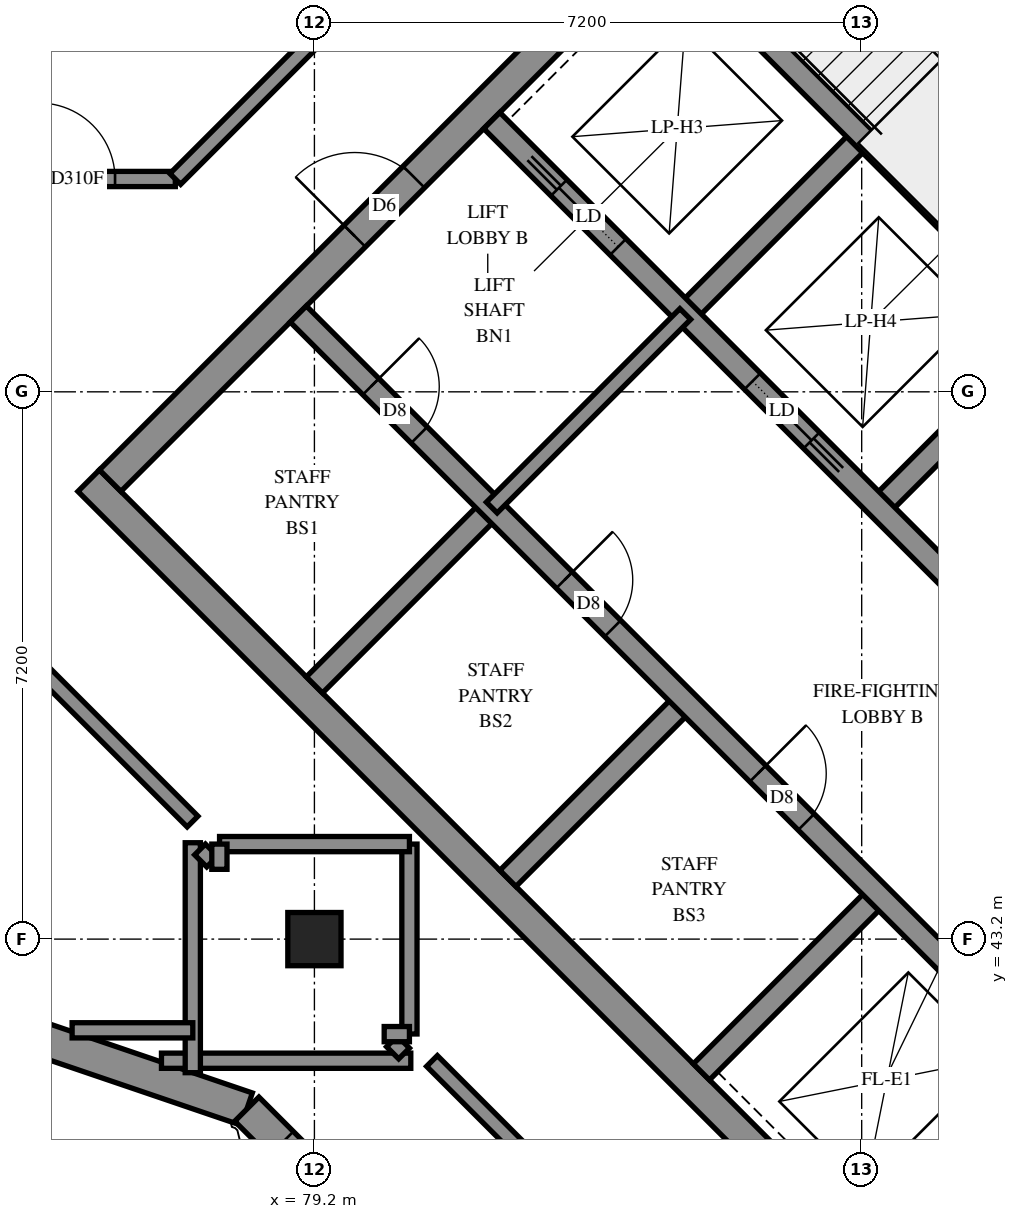
"""IFC4 building model, lengths in metres.
Left out: names, types, materials, properties, quantities, classifications, styles, units other than length and angle.
Written with IfcOpenShell. Run it as: python <this file> out.ifc"""

import sys

from ifc_helpers import new_model, si_unit, direction, frame, frame_2d, origin, origin_2d, place, context, subcontext, project, spatial, polyline, rectangle, outline, extrude, element, fill, save


model = new_model("IFC4")
c1 = context("Model", 3, precision=1e-05, world=origin(), true_north=direction((0.0, 1.0)))
c2 = subcontext(c1, "Body", "Model", "MODEL_VIEW")
j1 = project(units=[si_unit("LENGTHUNIT", "METRE"), si_unit("PLANEANGLEUNIT", "RADIAN")], contexts=[c1])
p1 = place(None, origin())
s1 = spatial("IfcSite", under=j1, at=p1, CompositionType="ELEMENT")
p2 = place(p1, origin())
s2 = spatial("IfcBuilding", under=s1, at=p2, CompositionType="ELEMENT")
p3 = place(p2, frame((0.0, 0.0, 281.2)))
s3 = spatial("IfcBuildingStorey", under=s2, at=p3, CompositionType="ELEMENT", Elevation=281.2)
p4 = place(p3, frame((79.2, 43.2, 0.0), z_axis=(0.0, 0.0, 1.0), x_axis=(1.0, 0.0, 0.0)))
e1 = element("IfcColumn", 1, at=p4, inside=s3, PredefinedType="COLUMN", context=c2, shape_type="SweptSolid", body=[
    extrude(rectangle(XDim=0.7, YDim=0.7, at=origin_2d()), origin(), (0.0, 0.0, 1.0), 3.1),
])
p5 = place(p3, frame((76.23, 49.231, -0.3), z_axis=(0.0, 0.0, 1.0), x_axis=(0.7071034917, -0.7071100706, 0.0)))
e2 = element("IfcWall", 2, at=p5, inside=s3, PredefinedType="SHEAR", context=c2, shape_type="SweptSolid", body=[
    extrude(rectangle(XDim=15.2, YDim=0.4, at=frame_2d((7.6, 0.0))), origin(), (0.0, 0.0, 1.0), 2.7),
])
p6 = place(p3, frame((86.695, 59.696, -0.3), z_axis=(0.0, 0.0, 1.0), x_axis=(0.7071100706, -0.7071034917, 0.0)))
e3 = element("IfcWall", 3, at=p6, inside=s3, PredefinedType="SHEAR", context=c2, shape_type="SweptSolid", body=[
    extrude(rectangle(XDim=15.2, YDim=0.4, at=frame_2d((7.6, 0.0))), origin(), (0.0, 0.0, 1.0), 2.7),
])
p7 = place(p6, frame((10.4, 0.0, 0.3)))
e4 = element("IfcOpeningElement", 4, at=p7, cuts=e3, PredefinedType="OPENING", context=c2, shape_type="SweptSolid", body=[
    extrude(rectangle(XDim=0.8, YDim=2.1, at=frame_2d((0.4, 1.05))), frame((0.0, 0.21, 0.0), z_axis=(0.0, -1.0, 0.0), x_axis=(1.0, 0.0, 0.0)), (0.0, 0.0, 1.0), 0.42),
])
p8 = place(p3, frame((76.513, 49.231, -0.3), z_axis=(0.0, 0.0, 1.0), x_axis=(0.7071067812, 0.7071067812, 0.0)))
e5 = element("IfcWall", 5, at=p8, inside=s3, PredefinedType="SHEAR", context=c2, shape_type="SweptSolid", body=[
    extrude(rectangle(XDim=14.4, YDim=0.4, at=frame_2d((7.2, 0.0))), origin(), (0.0, 0.0, 1.0), 2.7),
])
p9 = place(p8, frame((4.55, 0.0, 0.3)))
e6 = element("IfcOpeningElement", 6, at=p9, cuts=e5, PredefinedType="OPENING", context=c2, shape_type="SweptSolid", body=[
    extrude(rectangle(XDim=1.1, YDim=2.1, at=frame_2d((0.55, 1.05))), frame((0.0, 0.21, 0.0), z_axis=(0.0, -1.0, 0.0), x_axis=(1.0, 0.0, 0.0)), (0.0, 0.0, 1.0), 0.42),
])
p10 = place(p8, frame((11.35, 0.0, 0.3)))
e7 = element("IfcOpeningElement", 7, at=p10, cuts=e5, PredefinedType="OPENING", context=c2, shape_type="SweptSolid", body=[
    extrude(rectangle(XDim=1.1, YDim=2.1, at=frame_2d((0.55, 1.05))), frame((0.0, 0.21, 0.0), z_axis=(0.0, -1.0, 0.0), x_axis=(1.0, 0.0, 0.0)), (0.0, 0.0, 1.0), 0.42),
])
p11 = place(p3, frame((86.978, 38.766, -0.3), z_axis=(0.0, 0.0, 1.0), x_axis=(0.7071067812, 0.7071067812, 0.0)))
e8 = element("IfcWall", 8, at=p11, inside=s3, PredefinedType="SHEAR", context=c2, shape_type="SweptSolid", body=[
    extrude(rectangle(XDim=14.4, YDim=0.4, at=frame_2d((7.2, 0.0))), origin(), (0.0, 0.0, 1.0), 2.7),
])
p12 = place(p11, frame((4.55, 0.0, 0.3)))
e9 = element("IfcOpeningElement", 9, at=p12, cuts=e8, PredefinedType="OPENING", context=c2, shape_type="SweptSolid", body=[
    extrude(rectangle(XDim=1.1, YDim=2.1, at=frame_2d((0.55, 1.05))), frame((0.0, 0.21, 0.0), z_axis=(0.0, -1.0, 0.0), x_axis=(1.0, 0.0, 0.0)), (0.0, 0.0, 1.0), 0.42),
])
p13 = place(p11, frame((11.35, 0.0, 0.3)))
e10 = element("IfcOpeningElement", 10, at=p13, cuts=e8, PredefinedType="OPENING", context=c2, shape_type="SweptSolid", body=[
    extrude(rectangle(XDim=1.1, YDim=2.1, at=frame_2d((0.55, 1.05))), frame((0.0, 0.21, 0.0), z_axis=(0.0, -1.0, 0.0), x_axis=(1.0, 0.0, 0.0)), (0.0, 0.0, 1.0), 0.42),
])
for number, where, z_axis, x_axis in (
    (11, (79.2, 46.544, 0.0), (0.0, 0.0, 1.0), (0.707, 0.707, 0.0)),
    (12, (84.079, 51.423, 0.0), (0.0, 0.0, 1.0), (0.707, 0.707, 0.0)),
):
    element("IfcWall", number, at=place(p3, frame(where, z_axis=z_axis, x_axis=x_axis)), inside=s3, PredefinedType="SOLIDWALL", context=c2, shape_type="SweptSolid", body=[
        extrude(rectangle(XDim=3.3, YDim=0.3, at=frame_2d((1.65, 0.0))), origin(), (0.0, 0.0, 1.0), 3.1),
    ])
p14 = place(p3, frame((81.746, 43.999, 0.0), z_axis=(0.0, 0.0, 1.0), x_axis=(0.7071067812, 0.7071067812, 0.0)))
e13 = element("IfcWall", 13, at=p14, inside=s3, PredefinedType="SOLIDWALL", context=c2, shape_type="SweptSolid", body=[
    extrude(rectangle(XDim=3.3, YDim=0.3, at=frame_2d((1.65, 0.0))), origin(), (0.0, 0.0, 1.0), 3.1),
])
p15 = place(p3, frame((86.625, 48.878, 0.0), z_axis=(0.0, 0.0, 1.0), x_axis=(0.7071067812, 0.7071067812, 0.0)))
e14 = element("IfcWall", 14, at=p15, inside=s3, PredefinedType="SOLIDWALL", context=c2, shape_type="SweptSolid", body=[
    extrude(rectangle(XDim=3.3, YDim=0.3, at=frame_2d((1.65, 0.0))), origin(), (0.0, 0.0, 1.0), 3.1),
])
p16 = place(p3, frame((84.291, 41.453, 0.0), z_axis=(0.0, 0.0, 1.0), x_axis=(0.7071067812, 0.7071067812, 0.0)))
e15 = element("IfcWall", 15, at=p16, inside=s3, PredefinedType="SOLIDWALL", context=c2, shape_type="SweptSolid", body=[
    extrude(rectangle(XDim=3.3, YDim=0.3, at=frame_2d((1.65, 0.0))), origin(), (0.0, 0.0, 1.0), 3.1),
])
p17 = place(p3, frame((78.988, 51.423, 0.0), z_axis=(0.0, 0.0, 1.0), x_axis=(0.7071067812, -0.7071067812, 0.0)))
e16 = element("IfcWall", 16, at=p17, inside=s3, PredefinedType="SOLIDWALL", context=c2, shape_type="SweptSolid", body=[
    extrude(rectangle(XDim=14.4, YDim=0.3, at=frame_2d((7.2, 0.0))), origin(), (0.0, 0.0, 1.0), 3.1),
])
p18 = place(p17, frame((1.35, 0.0, 0.0)))
e17 = element("IfcOpeningElement", 17, at=p18, cuts=e16, PredefinedType="OPENING", context=c2, shape_type="SweptSolid", body=[
    extrude(rectangle(XDim=0.9, YDim=2.1, at=frame_2d((0.45, 1.05))), frame((0.0, 0.16, 0.0), z_axis=(0.0, -1.0, 0.0), x_axis=(1.0, 0.0, 0.0)), (0.0, 0.0, 1.0), 0.32),
])
p19 = place(p17, frame((4.95, 0.0, 0.0)))
e18 = element("IfcOpeningElement", 18, at=p19, cuts=e16, PredefinedType="OPENING", context=c2, shape_type="SweptSolid", body=[
    extrude(rectangle(XDim=0.9, YDim=2.1, at=frame_2d((0.45, 1.05))), frame((0.0, 0.16, 0.0), z_axis=(0.0, -1.0, 0.0), x_axis=(1.0, 0.0, 0.0)), (0.0, 0.0, 1.0), 0.32),
])
p20 = place(p17, frame((8.55, 0.0, 0.0)))
e19 = element("IfcOpeningElement", 19, at=p20, cuts=e16, PredefinedType="OPENING", context=c2, shape_type="SweptSolid", body=[
    extrude(rectangle(XDim=0.9, YDim=2.1, at=frame_2d((0.45, 1.05))), frame((0.0, 0.16, 0.0), z_axis=(0.0, -1.0, 0.0), x_axis=(1.0, 0.0, 0.0)), (0.0, 0.0, 1.0), 0.32),
])
p21 = place(p17, frame((12.05, 0.0, 0.0)))
e20 = element("IfcOpeningElement", 20, at=p21, cuts=e16, PredefinedType="OPENING", context=c2, shape_type="SweptSolid", body=[
    extrude(rectangle(XDim=1.1, YDim=2.1, at=frame_2d((0.55, 1.05))), frame((0.0, 0.16, 0.0), z_axis=(0.0, -1.0, 0.0), x_axis=(1.0, 0.0, 0.0)), (0.0, 0.0, 1.0), 0.32),
])
p22 = place(p3, frame((81.534, 53.969, 0.0), z_axis=(0.0, 0.0, 1.0), x_axis=(0.707103309, -0.7071102534, 0.0)))
e21 = element("IfcWall", 21, at=p22, inside=s3, PredefinedType="SOLIDWALL", context=c2, shape_type="SweptSolid", body=[
    extrude(rectangle(XDim=14.4, YDim=0.3, at=frame_2d((7.2, 0.0))), origin(), (0.0, 0.0, 1.0), 3.1),
])
p23 = place(p22, frame((8.55, 0.0, 0.0)))
e22 = element("IfcOpeningElement", 22, at=p23, cuts=e21, PredefinedType="OPENING", context=c2, shape_type="SweptSolid", body=[
    extrude(rectangle(XDim=0.9, YDim=2.1, at=frame_2d((0.45, 1.05))), frame((0.0, 0.16, 0.0), z_axis=(0.0, -1.0, 0.0), x_axis=(1.0, 0.0, 0.0)), (0.0, 0.0, 1.0), 0.32),
])
p24 = place(p22, frame((1.25, 0.0, 0.0)))
e23 = element("IfcOpeningElement", 23, at=p24, cuts=e21, PredefinedType="OPENING", context=c2, shape_type="SweptSolid", body=[
    extrude(rectangle(XDim=1.1, YDim=2.1, at=frame_2d((0.55, 1.05))), frame((0.0, 0.16, 0.0), z_axis=(0.0, -1.0, 0.0), x_axis=(1.0, 0.0, 0.0)), (0.0, 0.0, 1.0), 0.32),
])
p25 = place(p22, frame((4.85, 0.0, 0.0)))
e24 = element("IfcOpeningElement", 24, at=p25, cuts=e21, PredefinedType="OPENING", context=c2, shape_type="SweptSolid", body=[
    extrude(rectangle(XDim=1.1, YDim=2.1, at=frame_2d((0.55, 1.05))), frame((0.0, 0.16, 0.0), z_axis=(0.0, -1.0, 0.0), x_axis=(1.0, 0.0, 0.0)), (0.0, 0.0, 1.0), 0.32),
])
p26 = place(p22, frame((12.05, 0.0, 0.0)))
e25 = element("IfcOpeningElement", 25, at=p26, cuts=e21, PredefinedType="OPENING", context=c2, shape_type="SweptSolid", body=[
    extrude(rectangle(XDim=1.1, YDim=2.1, at=frame_2d((0.55, 1.05))), frame((0.0, 0.16, 0.0), z_axis=(0.0, -1.0, 0.0), x_axis=(1.0, 0.0, 0.0)), (0.0, 0.0, 1.0), 0.32),
])
p27 = place(p3, frame((83.867, 56.302, 0.0), z_axis=(0.0, 0.0, 1.0), x_axis=(0.7071137256, -0.7070998367, 0.0)))
e26 = element("IfcWall", 26, at=p27, inside=s3, PredefinedType="SOLIDWALL", context=c2, shape_type="SweptSolid", body=[
    extrude(rectangle(XDim=7.2, YDim=0.3, at=frame_2d((3.6, 0.0))), origin(), (0.0, 0.0, 1.0), 3.1),
])
p28 = place(p3, frame((74.583, 42.231, 0.0), z_axis=(0.0, 0.0, 1.0), x_axis=(0.9466967117, -0.3221262734, 0.0)))
e27 = element("IfcWall", 27, at=p28, inside=s3, PredefinedType="SOLIDWALL", context=c2, shape_type="SweptSolid", body=[
    extrude(outline(polyline([(0.058, -0.225), (3.885, -0.225), (3.99, 0.225), (-0.058, 0.225), (0.058, -0.225)])), origin(), (0.0, 0.0, 1.0), 3.1),
])
p29 = place(p3, frame((78.311, 40.963, 0.0), z_axis=(0.0, 0.0, 1.0), x_axis=(0.7071067812, -0.7071067812, 0.0)))
e28 = element("IfcWall", 28, at=p29, inside=s3, PredefinedType="SOLIDWALL", context=c2, shape_type="SweptSolid", body=[
    extrude(outline(polyline([(0.052, -0.225), (15.882, -0.225), (15.432, 0.225), (-0.052, 0.225), (0.052, -0.225)])), origin(), (0.0, 0.0, 1.0), 3.1),
])
p30 = place(p29, frame((0.641, 0.0, 0.45)))
e29 = element("IfcOpeningElement", 29, at=p30, cuts=e28, PredefinedType="OPENING", context=c2, shape_type="SweptSolid", body=[
    extrude(rectangle(XDim=2.8, YDim=2.55, at=frame_2d((1.4, 1.275))), frame((0.0, 0.235, 0.0), z_axis=(0.0, -1.0, 0.0), x_axis=(1.0, 0.0, 0.0)), (0.0, 0.0, 1.0), 0.47),
])
p31 = place(p29, frame((4.282, 0.0, 0.45)))
e30 = element("IfcOpeningElement", 30, at=p31, cuts=e28, PredefinedType="OPENING", context=c2, shape_type="SweptSolid", body=[
    extrude(rectangle(XDim=2.8, YDim=2.55, at=frame_2d((1.4, 1.275))), frame((0.0, 0.235, 0.0), z_axis=(0.0, -1.0, 0.0), x_axis=(1.0, 0.0, 0.0)), (0.0, 0.0, 1.0), 0.47),
])
p32 = place(p29, frame((7.882, 0.0, 0.45)))
e31 = element("IfcOpeningElement", 31, at=p32, cuts=e28, PredefinedType="OPENING", context=c2, shape_type="SweptSolid", body=[
    extrude(rectangle(XDim=2.8, YDim=2.55, at=frame_2d((1.4, 1.275))), frame((0.0, 0.235, 0.0), z_axis=(0.0, -1.0, 0.0), x_axis=(1.0, 0.0, 0.0)), (0.0, 0.0, 1.0), 0.47),
])
p33 = place(p29, frame((11.482, 0.0, 0.45)))
e32 = element("IfcOpeningElement", 32, at=p33, cuts=e28, PredefinedType="OPENING", context=c2, shape_type="SweptSolid", body=[
    extrude(rectangle(XDim=2.8, YDim=2.55, at=frame_2d((1.4, 1.275))), frame((0.0, 0.235, 0.0), z_axis=(0.0, -1.0, 0.0), x_axis=(1.0, 0.0, 0.0)), (0.0, 0.0, 1.0), 0.47),
])
p34 = place(p3, frame((81.534, 48.878, 0.0), z_axis=(0.0, 0.0, 1.0), x_axis=(0.707092892, 0.7071206701, 0.0)))
e33 = element("IfcWall", 33, at=p34, inside=s3, PredefinedType="PARTITIONING", context=c2, shape_type="SweptSolid", body=[
    extrude(rectangle(XDim=3.6, YDim=0.2, at=frame_2d((1.8, 0.0))), origin(), (0.0, 0.0, 1.0), 3.1),
])
p35 = place(p3, frame((86.306, 33.287, 0.0), z_axis=(0.0, 0.0, 1.0), x_axis=(0.7071020418, 0.7071115206, 0.0)))
e34 = element("IfcWall", 34, at=p35, inside=s3, PredefinedType="PARTITIONING", context=c2, shape_type="SweptSolid", body=[
    extrude(rectangle(XDim=10.55, YDim=0.2, at=frame_2d((5.275, 0.0))), origin(), (0.0, 0.0, 1.0), 3.1),
])
p36 = place(p3, frame((80.747, 41.597, 0.0), z_axis=(0.0, 0.0, 1.0), x_axis=(0.7071067812, -0.7071067812, 0.0)))
e35 = element("IfcWall", 35, at=p36, inside=s3, PredefinedType="PARTITIONING", context=c2, shape_type="SweptSolid", body=[
    extrude(rectangle(XDim=8.607, YDim=0.2, at=frame_2d((4.303, 0.0))), origin(), (0.0, 0.0, 1.0), 3.1),
])
p37 = place(p3, frame((86.837, 35.515, 0.0), z_axis=(0.0, 0.0, 1.0), x_axis=(0.7071067812, 0.7071067812, 0.0)))
e36 = element("IfcWall", 36, at=p37, inside=s3, PredefinedType="PARTITIONING", context=c2, shape_type="SweptSolid", body=[
    extrude(rectangle(XDim=8.598, YDim=0.2, at=frame_2d((4.299, 0.0))), origin(), (0.0, 0.0, 1.0), 3.1),
])
p38 = place(p37, frame((7.4, 0.0, 0.0)))
e37 = element("IfcOpeningElement", 37, at=p38, cuts=e36, PredefinedType="OPENING", context=c2, shape_type="SweptSolid", body=[
    extrude(rectangle(XDim=1.0, YDim=2.1, at=frame_2d((0.5, 1.05))), frame((0.0, 0.11, 0.0), z_axis=(0.0, -1.0, 0.0), x_axis=(1.0, 0.0, 0.0)), (0.0, 0.0, 1.0), 0.22),
])
p39 = place(p3, frame((74.347, 47.997, 0.0), z_axis=(0.0, 0.0, 1.0), x_axis=(0.7071067812, -0.7071067812, 0.0)))
e38 = element("IfcWall", 38, at=p39, inside=s3, PredefinedType="PARTITIONING", context=c2, shape_type="SweptSolid", body=[
    extrude(rectangle(XDim=4.596, YDim=0.2, at=frame_2d((2.298, 0.0))), origin(), (0.0, 0.0, 1.0), 3.1),
])
p40 = place(p39, frame((0.401, 0.0, 0.0)))
e39 = element("IfcOpeningElement", 39, at=p40, cuts=e38, PredefinedType="OPENING", context=c2, shape_type="SweptSolid", body=[
    extrude(rectangle(XDim=1.0, YDim=2.1, at=frame_2d((0.5, 1.05))), frame((0.0, 0.11, 0.0), z_axis=(0.0, -1.0, 0.0), x_axis=(1.0, 0.0, 0.0)), (0.0, 0.0, 1.0), 0.22),
])
p41 = place(p3, frame((77.188, 41.6, 0.0), z_axis=(0.0, 0.0, 1.0), x_axis=(1.0, 0.0, 0.0)))
e40 = element("IfcWall", 40, at=p41, inside=s3, PredefinedType="PARTITIONING", context=c2, shape_type="SweptSolid", body=[
    extrude(rectangle(XDim=3.28, YDim=0.2, at=frame_2d((1.64, 0.0))), origin(), (0.0, 0.0, 1.0), 3.1),
])
p42 = place(p3, frame((74.402, 53.2, 0.0), z_axis=(0.0, 0.0, 1.0), x_axis=(1.0, 0.0, 0.0)))
e41 = element("IfcWall", 41, at=p42, inside=s3, PredefinedType="PARTITIONING", context=c2, shape_type="SweptSolid", body=[
    extrude(rectangle(XDim=2.968, YDim=0.2, at=frame_2d((1.484, 0.0))), origin(), (0.0, 0.0, 1.0), 3.1),
])
p43 = place(p42, frame((1.175, 0.0, 0.0)))
e42 = element("IfcOpeningElement", 42, at=p43, cuts=e41, PredefinedType="OPENING", context=c2, shape_type="SweptSolid", body=[
    extrude(rectangle(XDim=1.0, YDim=2.1, at=frame_2d((0.5, 1.05))), frame((0.0, 0.11, 0.0), z_axis=(0.0, -1.0, 0.0), x_axis=(1.0, 0.0, 0.0)), (0.0, 0.0, 1.0), 0.22),
])
p44 = place(p3, frame((77.6, 41.443, 0.0), z_axis=(0.0, 0.0, 1.0), x_axis=(0.0, 1.0, 0.0)))
e43 = element("IfcWall", 43, at=p44, inside=s3, PredefinedType="PARTITIONING", context=c2, shape_type="SweptSolid", body=[
    extrude(rectangle(XDim=3.025, YDim=0.2, at=frame_2d((1.513, 0.0))), origin(), (0.0, 0.0, 1.0), 3.1),
])
p45 = place(p3, frame((77.37, 53.2, 0.0), z_axis=(0.0, 0.0, 1.0), x_axis=(0.7071067812, 0.7071067812, 0.0)))
e44 = element("IfcWall", 44, at=p45, inside=s3, PredefinedType="PARTITIONING", context=c2, shape_type="SweptSolid", body=[
    extrude(rectangle(XDim=2.786, YDim=0.2, at=frame_2d((1.393, 0.0))), origin(), (0.0, 0.0, 1.0), 3.1),
])
for number, where, z_axis, x_axis in (
    (45, (80.45, 41.952, 0.0), (0.0, 0.0, 1.0), (0.0, 1.0, 0.0)),
    (46, (77.952, 44.45, 0.0), (0.0, 0.0, 1.0), (1.0, 0.0, 0.0)),
):
    element("IfcWall", number, at=place(p3, frame(where, z_axis=z_axis, x_axis=x_axis)), inside=s3, PredefinedType="PARTITIONING", context=c2, shape_type="SweptSolid", body=[
        extrude(rectangle(XDim=2.498, YDim=0.2, at=frame_2d((1.249, 0.0))), origin(), (0.0, 0.0, 1.0), 3.1),
    ])
p46 = place(p3, frame((76.012, 42.0, 0.0), z_axis=(0.0, 0.0, 1.0), x_axis=(1.0, 0.0, 0.0)))
e47 = element("IfcWall", 47, at=p46, inside=s3, PredefinedType="PARTITIONING", context=c2, shape_type="SweptSolid", body=[
    extrude(rectangle(XDim=1.588, YDim=0.2, at=frame_2d((0.794, 0.0))), origin(), (0.0, 0.0, 1.0), 3.1),
])
for number, where, z_axis, x_axis in (
    (48, (80.221, 41.855, 0.0), (0.0, 0.0, 1.0), (0.707, -0.707, 0.0)),
    (49, (77.695, 44.38, 0.0), (0.0, 0.0, 1.0), (0.707, -0.707, 0.0)),
):
    element("IfcWall", number, at=place(p3, frame(where, z_axis=z_axis, x_axis=x_axis)), inside=s3, PredefinedType="PARTITIONING", context=c2, shape_type="SweptSolid", body=[
        extrude(rectangle(XDim=0.225, YDim=0.2, at=frame_2d((0.112, 0.0))), origin(), (0.0, 0.0, 1.0), 3.1),
    ])
for number, where, z_axis, x_axis in (
    (50, (80.118, 41.95, 0.0), (0.0, 0.0, 1.0), (1.0, 0.0, 0.0)),
    (51, (77.95, 44.118, 0.0), (0.0, 0.0, 1.0), (0.0, 1.0, 0.0)),
):
    element("IfcWall", number, at=place(p3, frame(where, z_axis=z_axis, x_axis=x_axis)), inside=s3, PredefinedType="PARTITIONING", context=c2, shape_type="SweptSolid", body=[
        extrude(rectangle(XDim=0.332, YDim=0.2, at=frame_2d((0.166, 0.0))), origin(), (0.0, 0.0, 1.0), 3.1),
    ])
p47 = place(p30, origin())
e52 = element("IfcWindow", 52, at=p47, inside=s3, PartitioningType="SINGLE_PANEL", PredefinedType="WINDOW", context=c2, shape_type="SweptSolid", body=[
    extrude(rectangle(XDim=2.8, YDim=2.55, at=frame_2d((1.4, 1.275))), frame((0.0, 0.205, 0.0), z_axis=(0.0, -1.0, 0.0), x_axis=(1.0, 0.0, 0.0)), (0.0, 0.0, 1.0), 0.06),
])
fill(e29, e52)
p48 = place(p9, origin())
e53 = element("IfcDoor", 53, at=p48, inside=s3, OperationType="DOUBLE_DOOR_SINGLE_SWING", PredefinedType="DOOR", context=c2, shape_type="SweptSolid", body=[
    extrude(rectangle(XDim=1.1, YDim=2.1, at=frame_2d((0.55, 1.05))), frame((0.0, 0.025, 0.0), z_axis=(0.0, -1.0, 0.0), x_axis=(1.0, 0.0, 0.0)), (0.0, 0.0, 1.0), 0.05),
])
fill(e6, e53)
p49 = place(p18, origin())
e54 = element("IfcDoor", 54, at=p49, inside=s3, OperationType="SINGLE_SWING_LEFT", PredefinedType="DOOR", context=c2, shape_type="SweptSolid", body=[
    extrude(rectangle(XDim=0.9, YDim=2.1, at=frame_2d((0.45, 1.05))), frame((0.0, 0.025, 0.0), z_axis=(0.0, -1.0, 0.0), x_axis=(1.0, 0.0, 0.0)), (0.0, 0.0, 1.0), 0.05),
])
fill(e17, e54)
p50 = place(p19, origin())
e55 = element("IfcDoor", 55, at=p50, inside=s3, OperationType="SINGLE_SWING_LEFT", PredefinedType="DOOR", context=c2, shape_type="SweptSolid", body=[
    extrude(rectangle(XDim=0.9, YDim=2.1, at=frame_2d((0.45, 1.05))), frame((0.0, 0.025, 0.0), z_axis=(0.0, -1.0, 0.0), x_axis=(1.0, 0.0, 0.0)), (0.0, 0.0, 1.0), 0.05),
])
fill(e18, e55)
p51 = place(p20, origin())
e56 = element("IfcDoor", 56, at=p51, inside=s3, OperationType="SINGLE_SWING_LEFT", PredefinedType="DOOR", context=c2, shape_type="SweptSolid", body=[
    extrude(rectangle(XDim=0.9, YDim=2.1, at=frame_2d((0.45, 1.05))), frame((0.0, 0.025, 0.0), z_axis=(0.0, -1.0, 0.0), x_axis=(1.0, 0.0, 0.0)), (0.0, 0.0, 1.0), 0.05),
])
fill(e19, e56)
p52 = place(p24, origin())
e57 = element("IfcDoor", 57, at=p52, inside=s3, OperationType="SLIDING_TO_LEFT", PredefinedType="DOOR", context=c2, shape_type="SweptSolid", body=[
    extrude(rectangle(XDim=1.1, YDim=2.1, at=frame_2d((0.55, 1.05))), frame((0.0, 0.025, 0.0), z_axis=(0.0, -1.0, 0.0), x_axis=(1.0, 0.0, 0.0)), (0.0, 0.0, 1.0), 0.05),
])
fill(e23, e57)
p53 = place(p25, origin())
e58 = element("IfcDoor", 58, at=p53, inside=s3, OperationType="SLIDING_TO_RIGHT", PredefinedType="DOOR", context=c2, shape_type="SweptSolid", body=[
    extrude(rectangle(XDim=1.1, YDim=2.1, at=frame_2d((0.55, 1.05))), frame((0.0, 0.025, 0.0), z_axis=(0.0, -1.0, 0.0), x_axis=(1.0, 0.0, 0.0)), (0.0, 0.0, 1.0), 0.05),
])
fill(e24, e58)
p54 = place(p43, origin())
e59 = element("IfcDoor", 59, at=p54, inside=s3, OperationType="SINGLE_SWING_LEFT", PredefinedType="DOOR", context=c2, shape_type="SweptSolid", body=[
    extrude(rectangle(XDim=1.0, YDim=2.1, at=frame_2d((0.5, 1.05))), frame((0.0, 0.025, 0.0), z_axis=(0.0, -1.0, 0.0), x_axis=(1.0, 0.0, 0.0)), (0.0, 0.0, 1.0), 0.05),
])
fill(e42, e59)
save(model, sys.argv[1])
